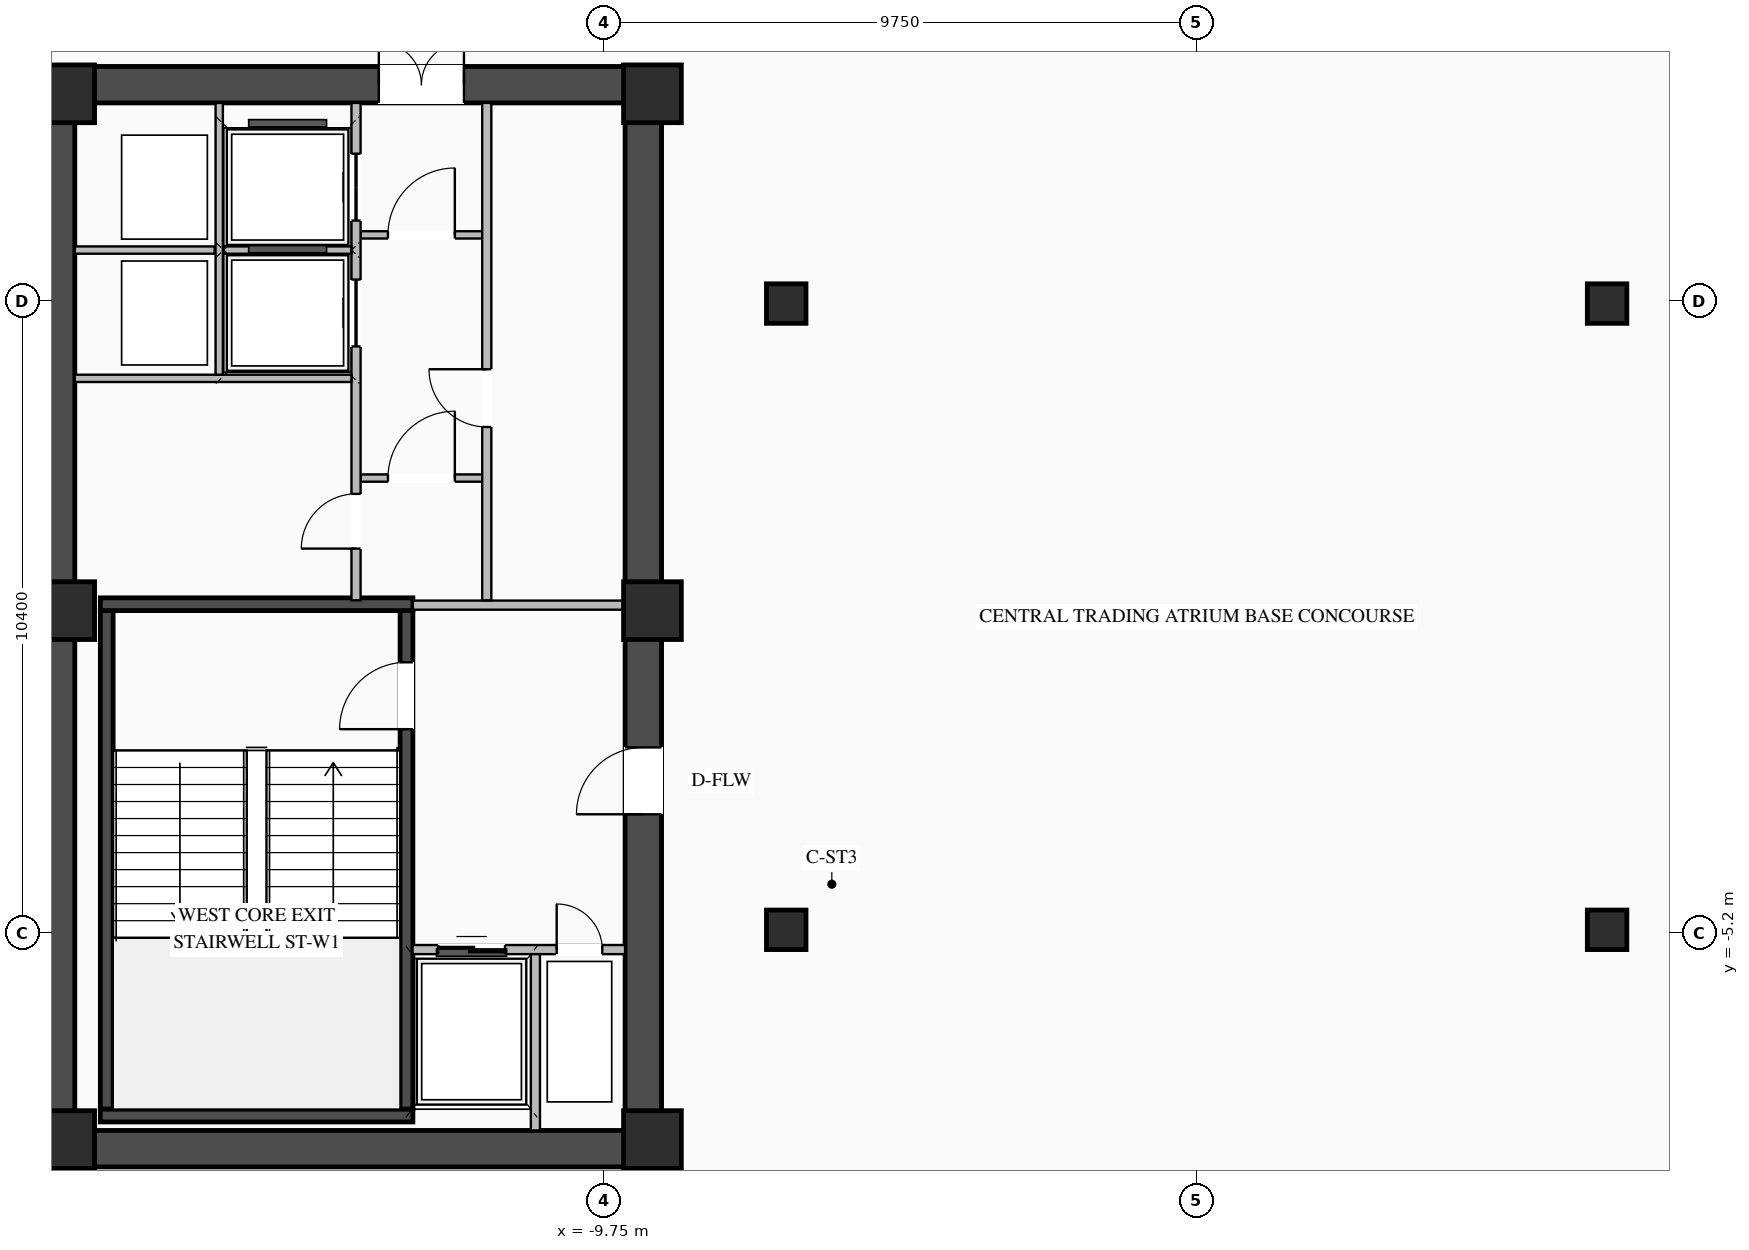
"""IFC4 building model, lengths in metres.
Left out: names, types, materials, properties, quantities, classifications, styles, units other than length and angle.
Written with IfcOpenShell. Run it as: python <this file> out.ifc"""

import sys

from ifc_helpers import new_model, si_unit, direction, frame, frame_2d, origin, origin_2d, place, context, subcontext, project, spatial, rectangle, i_section, extrude, element, fill, save


model = new_model("IFC4")
c1 = context("Model", 3, precision=1e-05, world=origin(), true_north=direction((0.0, 1.0)))
c2 = subcontext(c1, "Body", "Model", "MODEL_VIEW")
j1 = project(units=[si_unit("LENGTHUNIT", "METRE"), si_unit("PLANEANGLEUNIT", "RADIAN")], contexts=[c1])
p1 = place(None, origin())
s1 = spatial("IfcSite", under=j1, at=p1, CompositionType="ELEMENT")
p2 = place(p1, origin())
s2 = spatial("IfcBuilding", under=s1, at=p2, CompositionType="ELEMENT")
p3 = place(p2, frame((0.0, 0.0, 116.65)))
s3 = spatial("IfcBuildingStorey", under=s2, at=p3, CompositionType="ELEMENT", Elevation=116.65)
p4 = place(p3, frame((-19.05, -8.75, 0.0), z_axis=(0.0, 0.0, 1.0), x_axis=(1.0, 0.0, 0.0)))
e1 = element("IfcWall", 1, at=p4, inside=s3, PredefinedType="SHEAR", context=c2, shape_type="SweptSolid", body=[
    extrude(rectangle(XDim=10.25, YDim=0.6, at=frame_2d((5.125, 0.0))), origin(), (0.0, 0.0, 1.0), 4.02),
])
p5 = place(p3, frame((-19.05, 8.75, 0.0), z_axis=(0.0, 0.0, 1.0), x_axis=(1.0, 0.0, 0.0)))
e2 = element("IfcWall", 2, at=p5, inside=s3, PredefinedType="SHEAR", context=c2, shape_type="SweptSolid", body=[
    extrude(rectangle(XDim=10.25, YDim=0.6, at=frame_2d((5.125, 0.0))), origin(), (0.0, 0.0, 1.0), 4.02),
])
p6 = place(p5, frame((5.6, 0.0, 0.0)))
e3 = element("IfcOpeningElement", 3, at=p6, cuts=e2, PredefinedType="OPENING", context=c2, shape_type="SweptSolid", body=[
    extrude(rectangle(XDim=1.4, YDim=2.05, at=frame_2d((0.7, 1.025))), frame((0.0, 0.31, 0.0), z_axis=(0.0, -1.0, 0.0), x_axis=(1.0, 0.0, 0.0)), (0.0, 0.0, 1.0), 0.62),
])
p7 = place(p3, frame((-18.75, -8.45, 0.0), z_axis=(0.0, 0.0, 1.0), x_axis=(0.0, 1.0, 0.0)))
e4 = element("IfcWall", 4, at=p7, inside=s3, PredefinedType="SHEAR", context=c2, shape_type="SweptSolid", body=[
    extrude(rectangle(XDim=16.9, YDim=0.6, at=frame_2d((8.45, 0.0))), origin(), (0.0, 0.0, 1.0), 4.02),
])
p8 = place(p3, frame((-9.1, -8.45, 0.0), z_axis=(0.0, 0.0, 1.0), x_axis=(0.0, 1.0, 0.0)))
e5 = element("IfcWall", 5, at=p8, inside=s3, PredefinedType="SHEAR", context=c2, shape_type="SweptSolid", body=[
    extrude(rectangle(XDim=16.9, YDim=0.6, at=frame_2d((8.45, 0.0))), origin(), (0.0, 0.0, 1.0), 4.02),
])
p9 = place(p8, frame((5.2, 0.0, 0.0)))
e6 = element("IfcOpeningElement", 6, at=p9, cuts=e5, PredefinedType="OPENING", context=c2, shape_type="SweptSolid", body=[
    extrude(rectangle(XDim=1.1, YDim=2.08, at=frame_2d((0.55, 1.04))), frame((0.0, 0.31, 0.0), z_axis=(0.0, -1.0, 0.0), x_axis=(1.0, 0.0, 0.0)), (0.0, 0.0, 1.0), 0.62),
])
p10 = place(p3, frame((-12.995, -8.1, 0.0), z_axis=(0.0, 0.0, 1.0), x_axis=(0.0, 1.0, 0.0)))
e7 = element("IfcWall", 7, at=p10, inside=s3, PredefinedType="SHEAR", context=c2, shape_type="SweptSolid", body=[
    extrude(rectangle(XDim=8.2, YDim=0.21, at=frame_2d((4.1, 0.0))), origin(), (0.0, 0.0, 1.0), 4.02),
])
p11 = place(p10, frame((6.25, 0.0, 0.0)))
e8 = element("IfcOpeningElement", 8, at=p11, cuts=e7, PredefinedType="OPENING", context=c2, shape_type="SweptSolid", body=[
    extrude(rectangle(XDim=1.1, YDim=2.15, at=frame_2d((0.55, 1.075))), frame((0.0, 0.115, 0.0), z_axis=(0.0, -1.0, 0.0), x_axis=(1.0, 0.0, 0.0)), (0.0, 0.0, 1.0), 0.23),
])
p12 = place(p3, frame((-17.925, -8.1, 0.0), z_axis=(0.0, 0.0, 1.0), x_axis=(0.0, 1.0, 0.0)))
e9 = element("IfcWall", 9, at=p12, inside=s3, PredefinedType="SHEAR", context=c2, shape_type="SweptSolid", body=[
    extrude(rectangle(XDim=8.2, YDim=0.21, at=frame_2d((4.1, 0.0))), origin(), (0.0, 0.0, 1.0), 4.02),
])
for number, where, z_axis, x_axis in (
    (10, (-18.03, -8.205, 0.0), (0.0, 0.0, 1.0), (1.0, 0.0, 0.0)),
    (11, (-12.89, 0.205, 0.0), (0.0, 0.0, 1.0), (-1.0, 0.0, 0.0)),
):
    element("IfcWall", number, at=place(p3, frame(where, z_axis=z_axis, x_axis=x_axis)), inside=s3, PredefinedType="SHEAR", context=c2, shape_type="SweptSolid", body=[
        extrude(rectangle(XDim=5.14, YDim=0.21, at=frame_2d((2.57, 0.0))), origin(), (0.0, 0.0, 1.0), 4.02),
    ])
for number, where, z_axis, x_axis in (
    (12, (-8.95, -8.6, 0.0), (0.0, 0.0, 1.0), (1.0, 0.0, 0.0)),
    (13, (-8.95, 0.1, 0.0), (0.0, 0.0, 1.0), (1.0, 0.0, 0.0)),
    (14, (-8.95, 8.6, 0.0), (0.0, 0.0, 1.0), (1.0, 0.0, 0.0)),
    (15, (-18.6, -8.6, 0.0), (0.0, 0.0, 1.0), (1.0, 0.0, 0.0)),
    (16, (-18.6, 0.1, 0.0), (0.0, 0.0, 1.0), (1.0, 0.0, 0.0)),
    (17, (-18.6, 8.6, 0.0), (0.0, 0.0, 1.0), (1.0, 0.0, 0.0)),
):
    element("IfcColumn", number, at=place(p3, frame(where, z_axis=z_axis, x_axis=x_axis)), inside=s3, PredefinedType="COLUMN", context=c2, shape_type="SweptSolid", body=[
        extrude(rectangle(XDim=0.95, YDim=0.95, at=origin_2d()), origin(), (0.0, 0.0, 1.0), 4.2),
    ])
for number, where, z_axis, x_axis in (
    (18, (-6.75, -5.15, 0.0), (0.0, 0.0, 1.0), (1.0, 0.0, 0.0)),
    (19, (-6.75, 5.15, 0.0), (0.0, 0.0, 1.0), (1.0, 0.0, 0.0)),
    (20, (6.75, -5.15, 0.0), (0.0, 0.0, 1.0), (1.0, 0.0, 0.0)),
    (21, (6.75, 5.15, 0.0), (0.0, 0.0, 1.0), (1.0, 0.0, 0.0)),
):
    element("IfcColumn", number, at=place(p3, frame(where, z_axis=z_axis, x_axis=x_axis)), inside=s3, PredefinedType="COLUMN", context=c2, shape_type="SweptSolid", body=[
        extrude(i_section(OverallWidth=0.65, OverallDepth=0.65, WebThickness=0.028, FlangeThickness=0.04, at=origin_2d()), origin(), (0.0, 0.0, 1.0), 4.2),
    ])
p13 = place(p3, frame((-12.895, -5.475, 0.0), z_axis=(0.0, 0.0, 1.0), x_axis=(1.0, 0.0, 0.0)))
e22 = element("IfcWall", 22, at=p13, inside=s3, PredefinedType="STANDARD", context=c2, shape_type="SweptSolid", body=[
    extrude(rectangle(XDim=3.495, YDim=0.15, at=frame_2d((1.748, 0.0))), origin(), (0.0, 0.0, 1.0), 4.0),
])
p14 = place(p13, frame((0.42, 0.0, 0.0)))
e23 = element("IfcOpeningElement", 23, at=p14, cuts=e22, PredefinedType="OPENING", context=c2, shape_type="SweptSolid", body=[
    extrude(rectangle(XDim=1.1, YDim=2.15, at=frame_2d((0.55, 1.075))), frame((0.0, 0.085, 0.0), z_axis=(0.0, -1.0, 0.0), x_axis=(1.0, 0.0, 0.0)), (0.0, 0.0, 1.0), 0.17),
])
p15 = place(p13, frame((2.37, 0.0, 0.0)))
e24 = element("IfcOpeningElement", 24, at=p15, cuts=e22, PredefinedType="OPENING", context=c2, shape_type="SweptSolid", body=[
    extrude(rectangle(XDim=0.75, YDim=2.05, at=frame_2d((0.375, 1.025))), frame((0.0, 0.085, 0.0), z_axis=(0.0, -1.0, 0.0), x_axis=(1.0, 0.0, 0.0)), (0.0, 0.0, 1.0), 0.17),
])
p16 = place(p3, frame((-10.875, -8.45, 0.0), z_axis=(0.0, 0.0, 1.0), x_axis=(0.0, 1.0, 0.0)))
e25 = element("IfcWall", 25, at=p16, inside=s3, PredefinedType="STANDARD", context=c2, shape_type="SweptSolid", body=[
    extrude(rectangle(XDim=2.9, YDim=0.15, at=frame_2d((1.45, 0.0))), origin(), (0.0, 0.0, 1.0), 4.0),
])
p17 = place(p3, frame((-12.89, 0.19, 0.0), z_axis=(0.0, 0.0, 1.0), x_axis=(1.0, 0.0, 0.0)))
e26 = element("IfcWall", 26, at=p17, inside=s3, PredefinedType="STANDARD", context=c2, shape_type="SweptSolid", body=[
    extrude(rectangle(XDim=3.49, YDim=0.15, at=frame_2d((1.745, 0.0))), origin(), (0.0, 0.0, 1.0), 3.395),
])
p18 = place(p3, frame((-13.75, 2.28, 0.0), z_axis=(0.0, 0.0, 1.0), x_axis=(1.0, 0.0, 0.0)))
e27 = element("IfcWall", 27, at=p18, inside=s3, PredefinedType="STANDARD", context=c2, shape_type="SweptSolid", body=[
    extrude(rectangle(XDim=2.0, YDim=0.12, at=frame_2d((1.0, 0.0))), origin(), (0.0, 0.0, 1.0), 4.0),
])
p19 = place(p18, frame((0.45, 0.0, 0.0)))
e28 = element("IfcOpeningElement", 28, at=p19, cuts=e27, PredefinedType="OPENING", context=c2, shape_type="SweptSolid", body=[
    extrude(rectangle(XDim=1.1, YDim=2.1, at=frame_2d((0.55, 1.05))), frame((0.0, 0.07, 0.0), z_axis=(0.0, -1.0, 0.0), x_axis=(1.0, 0.0, 0.0)), (0.0, 0.0, 1.0), 0.14),
])
p20 = place(p3, frame((-13.75, 6.28, 0.0), z_axis=(0.0, 0.0, 1.0), x_axis=(1.0, 0.0, 0.0)))
e29 = element("IfcWall", 29, at=p20, inside=s3, PredefinedType="STANDARD", context=c2, shape_type="SweptSolid", body=[
    extrude(rectangle(XDim=2.0, YDim=0.12, at=frame_2d((1.0, 0.0))), origin(), (0.0, 0.0, 1.0), 4.0),
])
p21 = place(p20, frame((0.45, 0.0, 0.0)))
e30 = element("IfcOpeningElement", 30, at=p21, cuts=e29, PredefinedType="OPENING", context=c2, shape_type="SweptSolid", body=[
    extrude(rectangle(XDim=1.1, YDim=2.1, at=frame_2d((0.55, 1.05))), frame((0.0, 0.07, 0.0), z_axis=(0.0, -1.0, 0.0), x_axis=(1.0, 0.0, 0.0)), (0.0, 0.0, 1.0), 0.14),
])
p22 = place(p3, frame((-11.675, 0.27, 0.0), z_axis=(0.0, 0.0, 1.0), x_axis=(0.0, 1.0, 0.0)))
e31 = element("IfcWall", 31, at=p22, inside=s3, PredefinedType="STANDARD", context=c2, shape_type="SweptSolid", body=[
    extrude(rectangle(XDim=8.18, YDim=0.15, at=frame_2d((4.09, 0.0))), origin(), (0.0, 0.0, 1.0), 4.0),
])
p23 = place(p22, frame((2.85, 0.0, 0.0)))
e32 = element("IfcOpeningElement", 32, at=p23, cuts=e31, PredefinedType="OPENING", context=c2, shape_type="SweptSolid", body=[
    extrude(rectangle(XDim=0.95, YDim=2.05, at=frame_2d((0.475, 1.025))), frame((0.0, 0.085, 0.0), z_axis=(0.0, -1.0, 0.0), x_axis=(1.0, 0.0, 0.0)), (0.0, 0.0, 1.0), 0.17),
])
p24 = place(p3, frame((-13.825, 0.27, 0.0), z_axis=(0.0, 0.0, 1.0), x_axis=(0.0, 1.0, 0.0)))
e33 = element("IfcWall", 33, at=p24, inside=s3, PredefinedType="STANDARD", context=c2, shape_type="SweptSolid", body=[
    extrude(rectangle(XDim=8.18, YDim=0.15, at=frame_2d((4.09, 0.0))), origin(), (0.0, 0.0, 1.0), 4.0),
])
p25 = place(p24, frame((4.175, 0.0, 0.0)))
e34 = element("IfcOpeningElement", 34, at=p25, cuts=e33, PredefinedType="OPENING", context=c2, shape_type="SweptSolid", body=[
    extrude(rectangle(XDim=1.1, YDim=2.1, at=frame_2d((0.55, 1.05))), frame((0.0, 0.085, 0.0), z_axis=(0.0, -1.0, 0.0), x_axis=(1.0, 0.0, 0.0)), (0.0, 0.0, 1.0), 0.17),
])
p26 = place(p24, frame((6.245, 0.0, 0.0)))
e35 = element("IfcOpeningElement", 35, at=p26, cuts=e33, PredefinedType="OPENING", context=c2, shape_type="SweptSolid", body=[
    extrude(rectangle(XDim=1.1, YDim=2.1, at=frame_2d((0.55, 1.05))), frame((0.0, 0.085, 0.0), z_axis=(0.0, -1.0, 0.0), x_axis=(1.0, 0.0, 0.0)), (0.0, 0.0, 1.0), 0.17),
])
p27 = place(p24, frame((0.85, 0.0, 0.0)))
e36 = element("IfcOpeningElement", 36, at=p27, cuts=e33, PredefinedType="OPENING", context=c2, shape_type="SweptSolid", body=[
    extrude(rectangle(XDim=0.9, YDim=2.05, at=frame_2d((0.45, 1.025))), frame((0.0, 0.085, 0.0), z_axis=(0.0, -1.0, 0.0), x_axis=(1.0, 0.0, 0.0)), (0.0, 0.0, 1.0), 0.17),
])
p28 = place(p3, frame((-18.45, 3.92, 0.0), z_axis=(0.0, 0.0, 1.0), x_axis=(1.0, 0.0, 0.0)))
e37 = element("IfcWall", 37, at=p28, inside=s3, PredefinedType="STANDARD", context=c2, shape_type="SweptSolid", body=[
    extrude(rectangle(XDim=4.55, YDim=0.12, at=frame_2d((2.275, 0.0))), origin(), (0.0, 0.0, 1.0), 4.0),
])
p29 = place(p3, frame((-18.45, 6.03, 0.0), z_axis=(0.0, 0.0, 1.0), x_axis=(1.0, 0.0, 0.0)))
e38 = element("IfcWall", 38, at=p29, inside=s3, PredefinedType="STANDARD", context=c2, shape_type="SweptSolid", body=[
    extrude(rectangle(XDim=2.3, YDim=0.12, at=frame_2d((1.15, 0.0))), origin(), (0.0, 0.0, 1.0), 4.0),
])
p30 = place(p3, frame((-16.075, 3.98, 0.0), z_axis=(0.0, 0.0, 1.0), x_axis=(0.0, 1.0, 0.0)))
e39 = element("IfcWall", 39, at=p30, inside=s3, PredefinedType="STANDARD", context=c2, shape_type="SweptSolid", body=[
    extrude(rectangle(XDim=4.47, YDim=0.12, at=frame_2d((2.235, 0.0))), origin(), (0.0, 0.0, 1.0), 4.0),
])
p31 = place(p3, frame((-16.0, 6.03, 0.0), z_axis=(0.0, 0.0, 1.0), x_axis=(1.0, 0.0, 0.0)))
e40 = element("IfcWall", 40, at=p31, inside=s3, PredefinedType="STANDARD", context=c2, shape_type="SweptSolid", body=[
    extrude(rectangle(XDim=2.1, YDim=0.12, at=frame_2d((1.05, 0.0))), origin(), (0.0, 0.0, 1.0), 4.0),
])
p32 = place(p11, origin())
e41 = element("IfcDoor", 41, at=p32, inside=s3, OperationType="SINGLE_SWING_LEFT", PredefinedType="DOOR", context=c2, shape_type="SweptSolid", body=[
    extrude(rectangle(XDim=1.1, YDim=2.15, at=frame_2d((0.55, 1.075))), frame((0.0, 0.025, 0.0), z_axis=(0.0, -1.0, 0.0), x_axis=(1.0, 0.0, 0.0)), (0.0, 0.0, 1.0), 0.05),
])
fill(e8, e41)
p33 = place(p14, origin())
e42 = element("IfcDoor", 42, at=p33, inside=s3, OperationType="DOUBLE_DOOR_SLIDING", PredefinedType="DOOR", context=c2, shape_type="SweptSolid", body=[
    extrude(rectangle(XDim=1.1, YDim=2.15, at=frame_2d((0.55, 1.075))), frame((0.0, 0.025, 0.0), z_axis=(0.0, -1.0, 0.0), x_axis=(1.0, 0.0, 0.0)), (0.0, 0.0, 1.0), 0.05),
])
fill(e23, e42)
p34 = place(p15, origin())
e43 = element("IfcDoor", 43, at=p34, inside=s3, OperationType="SINGLE_SWING_LEFT", PredefinedType="DOOR", context=c2, shape_type="SweptSolid", body=[
    extrude(rectangle(XDim=0.75, YDim=2.05, at=frame_2d((0.375, 1.025))), frame((0.0, 0.025, 0.0), z_axis=(0.0, -1.0, 0.0), x_axis=(1.0, 0.0, 0.0)), (0.0, 0.0, 1.0), 0.05),
])
fill(e24, e43)
p35 = place(p9, origin())
e44 = element("IfcDoor", 44, at=p35, inside=s3, OperationType="SINGLE_SWING_LEFT", PredefinedType="DOOR", context=c2, shape_type="SweptSolid", body=[
    extrude(rectangle(XDim=1.1, YDim=2.08, at=frame_2d((0.55, 1.04))), frame((0.0, 0.255, 0.0), z_axis=(0.0, -1.0, 0.0), x_axis=(1.0, 0.0, 0.0)), (0.0, 0.0, 1.0), 0.05),
])
fill(e6, e44)
p36 = place(p19, origin())
e45 = element("IfcDoor", 45, at=p36, inside=s3, OperationType="SINGLE_SWING_RIGHT", PredefinedType="DOOR", context=c2, shape_type="SweptSolid", body=[
    extrude(rectangle(XDim=1.1, YDim=2.1, at=frame_2d((0.55, 1.05))), frame((0.0, 0.025, 0.0), z_axis=(0.0, -1.0, 0.0), x_axis=(1.0, 0.0, 0.0)), (0.0, 0.0, 1.0), 0.05),
])
fill(e28, e45)
p37 = place(p21, origin())
e46 = element("IfcDoor", 46, at=p37, inside=s3, OperationType="SINGLE_SWING_RIGHT", PredefinedType="DOOR", context=c2, shape_type="SweptSolid", body=[
    extrude(rectangle(XDim=1.1, YDim=2.1, at=frame_2d((0.55, 1.05))), frame((0.0, 0.025, 0.0), z_axis=(0.0, -1.0, 0.0), x_axis=(1.0, 0.0, 0.0)), (0.0, 0.0, 1.0), 0.05),
])
fill(e30, e46)
p38 = place(p6, origin())
e47 = element("IfcDoor", 47, at=p38, inside=s3, OperationType="DOUBLE_DOOR_SINGLE_SWING", PredefinedType="DOOR", context=c2, shape_type="SweptSolid", body=[
    extrude(rectangle(XDim=1.4, YDim=2.05, at=frame_2d((0.7, 1.025))), frame((0.0, 0.245, 0.0), z_axis=(0.0, -1.0, 0.0), x_axis=(1.0, 0.0, 0.0)), (0.0, 0.0, 1.0), 0.05),
])
fill(e3, e47)
p39 = place(p23, origin())
e48 = element("IfcDoor", 48, at=p39, inside=s3, OperationType="SINGLE_SWING_RIGHT", PredefinedType="DOOR", context=c2, shape_type="SweptSolid", body=[
    extrude(rectangle(XDim=0.95, YDim=2.05, at=frame_2d((0.475, 1.025))), frame((0.0, 0.025, 0.0), z_axis=(0.0, -1.0, 0.0), x_axis=(1.0, 0.0, 0.0)), (0.0, 0.0, 1.0), 0.05),
])
fill(e32, e48)
p40 = place(p25, origin())
e49 = element("IfcDoor", 49, at=p40, inside=s3, OperationType="DOUBLE_DOOR_SLIDING", PredefinedType="DOOR", context=c2, shape_type="SweptSolid", body=[
    extrude(rectangle(XDim=1.1, YDim=2.1, at=frame_2d((0.55, 1.05))), frame((0.0, 0.025, 0.0), z_axis=(0.0, -1.0, 0.0), x_axis=(1.0, 0.0, 0.0)), (0.0, 0.0, 1.0), 0.05),
])
fill(e34, e49)
p41 = place(p26, origin())
e50 = element("IfcDoor", 50, at=p41, inside=s3, OperationType="DOUBLE_DOOR_SLIDING", PredefinedType="DOOR", context=c2, shape_type="SweptSolid", body=[
    extrude(rectangle(XDim=1.1, YDim=2.1, at=frame_2d((0.55, 1.05))), frame((0.0, 0.025, 0.0), z_axis=(0.0, -1.0, 0.0), x_axis=(1.0, 0.0, 0.0)), (0.0, 0.0, 1.0), 0.05),
])
fill(e35, e50)
p42 = place(p27, origin())
e51 = element("IfcDoor", 51, at=p42, inside=s3, OperationType="SINGLE_SWING_LEFT", PredefinedType="DOOR", context=c2, shape_type="SweptSolid", body=[
    extrude(rectangle(XDim=0.9, YDim=2.05, at=frame_2d((0.45, 1.025))), frame((0.0, 0.025, 0.0), z_axis=(0.0, -1.0, 0.0), x_axis=(1.0, 0.0, 0.0)), (0.0, 0.0, 1.0), 0.05),
])
fill(e36, e51)
save(model, sys.argv[1])
